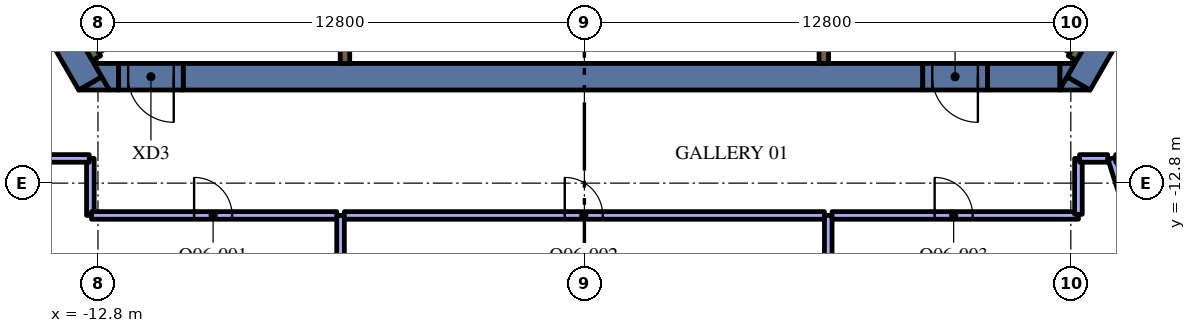
"""IFC4 building model, lengths in metres.
Left out: names, types, materials, properties, quantities, classifications, styles, units other than length and angle.
Written with IfcOpenShell. Run it as: python <this file> out.ifc"""

import sys

from ifc_helpers import new_model, si_unit, direction, frame, frame_2d, origin, place, context, subcontext, project, spatial, polyline, rectangle, outline, extrude, element, fill, save


model = new_model("IFC4")
c1 = context("Model", 3, precision=1e-05, world=origin(), true_north=direction((0.0, 1.0)))
c2 = subcontext(c1, "Body", "Model", "MODEL_VIEW")
j1 = project(units=[si_unit("LENGTHUNIT", "METRE"), si_unit("PLANEANGLEUNIT", "RADIAN")], contexts=[c1])
p1 = place(None, origin())
s1 = spatial("IfcSite", under=j1, at=p1, CompositionType="ELEMENT")
p2 = place(p1, origin())
s2 = spatial("IfcBuilding", under=s1, at=p2, CompositionType="ELEMENT")
p3 = place(p2, frame((0.0, 0.0, 210.0)))
s3 = spatial("IfcBuildingStorey", under=s2, at=p3, CompositionType="ELEMENT", Elevation=210.0)
p4 = place(p3, frame((13.003, -10.179, 0.0), z_axis=(0.0, 0.0, 1.0), x_axis=(0.499972675833, 0.866041178825, 0.0)))
e1 = element("IfcWall", 1, at=p4, inside=s3, PredefinedType="SOLIDWALL", context=c2, shape_type="SweptSolid", body=[
    extrude(rectangle(XDim=3.829, YDim=0.7, at=frame_2d((1.915, 0.0))), origin(), (0.0, 0.0, 1.0), 4.2),
])
p5 = place(p3, origin())
e2 = element("IfcWall", 2, at=p5, inside=s3, PredefinedType="SOLIDWALL", context=c2, shape_type="SweptSolid", body=[
    extrude(outline(polyline([(12.698, -10.005), (13.296, -10.35), (12.5, -10.35), (12.698, -10.005)])), origin(), (0.0, 0.0, 1.0), 4.2),
])
p6 = place(p3, frame((10.604, -10.0, 0.0), z_axis=(0.0, 0.0, 1.0), x_axis=(1.0, 0.0, 0.0)))
e3 = element("IfcWall", 3, at=p6, inside=s3, PredefinedType="SOLIDWALL", context=c2, shape_type="SweptSolid", body=[
    extrude(rectangle(XDim=1.909, YDim=0.7, at=frame_2d((0.955, 0.0))), origin(), (0.0, 0.0, 1.0), 4.2),
])
e4 = element("IfcWall", 4, at=p5, inside=s3, PredefinedType="SOLIDWALL", context=c2, shape_type="SweptSolid", body=[
    extrude(outline(polyline([(12.904, -9.65), (12.516, -10.322), (12.516, -9.65), (12.904, -9.65)])), origin(), (0.0, 0.0, 1.0), 4.2),
])
p7 = place(p3, frame((-14.917, -6.863, 0.0), z_axis=(0.0, 0.0, 1.0), x_axis=(0.499972675833, -0.866041178825, 0.0)))
e5 = element("IfcWall", 5, at=p7, inside=s3, PredefinedType="SOLIDWALL", context=c2, shape_type="SweptSolid", body=[
    extrude(rectangle(XDim=3.829, YDim=0.7, at=frame_2d((1.915, 0.0))), origin(), (0.0, 0.0, 1.0), 4.2),
])
e6 = element("IfcWall", 6, at=p5, inside=s3, PredefinedType="SOLIDWALL", context=c2, shape_type="SweptSolid", body=[
    extrude(outline(polyline([(-12.5, -10.35), (-13.296, -10.35), (-12.698, -10.005), (-12.5, -10.35)])), origin(), (0.0, 0.0, 1.0), 4.2),
])
e7 = element("IfcWall", 7, at=p5, inside=s3, PredefinedType="SOLIDWALL", context=c2, shape_type="SweptSolid", body=[
    extrude(outline(polyline([(-12.257, -10.35), (-12.5, -10.35), (-12.904, -9.65), (-12.257, -9.65), (-12.257, -10.35)])), origin(), (0.0, 0.0, 1.0), 4.2),
])
p8 = place(p3, frame((-10.556, -10.0, 0.0), z_axis=(0.0, 0.0, 1.0), x_axis=(1.0, 0.0, 0.0)))
e8 = element("IfcWall", 8, at=p8, inside=s3, PredefinedType="SOLIDWALL", context=c2, shape_type="SweptSolid", body=[
    extrude(rectangle(XDim=19.461, YDim=0.7, at=frame_2d((9.73, 0.0))), origin(), (0.0, 0.0, 1.0), 4.2),
])
p9 = place(p3, frame((12.84, -9.511, 0.0), z_axis=(0.0, 0.0, 1.0), x_axis=(0.500048121057, 0.865997619297, 0.0)))
e9 = element("IfcWall", 9, at=p9, inside=s3, PredefinedType="SOLIDWALL", context=c2, shape_type="SweptSolid", body=[
    extrude(rectangle(XDim=3.634, YDim=0.25, at=frame_2d((1.817, 0.0))), origin(), (0.0, 0.0, 1.0), 4.2),
])
p10 = place(p3, frame((12.84, -9.261, 0.0), z_axis=(0.0, 0.0, 1.0), x_axis=(-0.866013990052, 0.500019768644, 0.0)))
e10 = element("IfcWall", 10, at=p10, inside=s3, PredefinedType="SOLIDWALL", context=c2, shape_type="SweptSolid", body=[
    extrude(rectangle(XDim=6.8, YDim=0.25, at=frame_2d((3.4, 0.0))), origin(), (0.0, 0.0, 1.0), 4.2),
])
p11 = place(p3, frame((-12.84, -9.511, 0.0), z_axis=(0.0, 0.0, 1.0), x_axis=(-0.500048121057, 0.865997619297, 0.0)))
e11 = element("IfcWall", 11, at=p11, inside=s3, PredefinedType="SOLIDWALL", context=c2, shape_type="SweptSolid", body=[
    extrude(rectangle(XDim=3.634, YDim=0.25, at=frame_2d((1.817, 0.0))), origin(), (0.0, 0.0, 1.0), 4.2),
])
p12 = place(p3, frame((-12.84, -9.261, 0.0), z_axis=(0.0, 0.0, 1.0), x_axis=(0.866016039709, 0.500016218704, 0.0)))
e12 = element("IfcWall", 12, at=p12, inside=s3, PredefinedType="SOLIDWALL", context=c2, shape_type="SweptSolid", body=[
    extrude(rectangle(XDim=7.05, YDim=0.25, at=frame_2d((3.525, 0.0))), origin(), (0.0, 0.0, 1.0), 4.2),
])
p13 = place(p3, frame((-6.3, -9.052, 0.0), z_axis=(0.0, 0.0, 1.0), x_axis=(0.0, -1.0, 0.0)))
e13 = element("IfcWall", 13, at=p13, inside=s3, PredefinedType="SOLIDWALL", context=c2, shape_type="SweptSolid", body=[
    extrude(rectangle(XDim=0.598, YDim=0.25, at=frame_2d((0.299, 0.0))), origin(), (0.0, 0.0, 1.0), 4.2),
])
p14 = place(p3, frame((6.3, -9.65, 0.0), z_axis=(0.0, 0.0, 1.0), x_axis=(0.0, 1.0, 0.0)))
e14 = element("IfcWall", 14, at=p14, inside=s3, PredefinedType="SOLIDWALL", context=c2, shape_type="SweptSolid", body=[
    extrude(rectangle(XDim=1.008, YDim=0.25, at=frame_2d((0.504, 0.0))), origin(), (0.0, 0.0, 1.0), 4.2),
])
p15 = place(p3, frame((10.604, -10.0, 0.0), z_axis=(0.0, 0.0, 1.0), x_axis=(-1.0, 0.0, 0.0)))
e15 = element("IfcWall", 15, at=p15, inside=s3, PredefinedType="SOLIDWALL", context=c2, shape_type="SweptSolid", body=[
    extrude(rectangle(XDim=1.7, YDim=0.7, at=frame_2d((0.85, 0.0))), origin(), (0.0, 0.0, 1.0), 4.2),
])
p16 = place(p15, frame((0.25, 0.0, 0.0)))
e16 = element("IfcOpeningElement", 16, at=p16, cuts=e15, PredefinedType="OPENING", context=c2, shape_type="SweptSolid", body=[
    extrude(rectangle(XDim=1.2, YDim=2.1, at=frame_2d((0.6, 1.05))), frame((0.0, 0.36, 0.0), z_axis=(0.0, -1.0, 0.0), x_axis=(1.0, 0.0, 0.0)), (0.0, 0.0, 1.0), 0.72),
])
p17 = place(p3, frame((-10.556, -10.0, 0.0), z_axis=(0.0, 0.0, 1.0), x_axis=(-1.0, 0.0, 0.0)))
e17 = element("IfcWall", 17, at=p17, inside=s3, PredefinedType="SOLIDWALL", context=c2, shape_type="SweptSolid", body=[
    extrude(rectangle(XDim=1.7, YDim=0.7, at=frame_2d((0.85, 0.0))), origin(), (0.0, 0.0, 1.0), 4.2),
])
p18 = place(p17, frame((0.25, 0.0, 0.0)))
e18 = element("IfcOpeningElement", 18, at=p18, cuts=e17, PredefinedType="OPENING", context=c2, shape_type="SweptSolid", body=[
    extrude(rectangle(XDim=1.2, YDim=2.1, at=frame_2d((0.6, 1.05))), frame((0.0, 0.36, 0.0), z_axis=(0.0, -1.0, 0.0), x_axis=(1.0, 0.0, 0.0)), (0.0, 0.0, 1.0), 0.72),
])
p19 = place(p3, frame((-6.417, -13.65, 0.0), z_axis=(0.0, 0.0, 1.0), x_axis=(0.0, -1.0, 0.0)))
e19 = element("IfcWall", 19, at=p19, inside=s3, PredefinedType="PARTITIONING", context=c2, shape_type="SweptSolid", body=[
    extrude(rectangle(XDim=5.247, YDim=0.2, at=frame_2d((2.624, 0.0))), origin(), (0.0, 0.0, 1.0), 3.45),
])
p20 = place(p3, frame((-13.0, -12.15, 0.0), z_axis=(0.0, 0.0, 1.0), x_axis=(0.0, -1.0, 0.0)))
e20 = element("IfcWall", 20, at=p20, inside=s3, PredefinedType="PARTITIONING", context=c2, shape_type="SweptSolid", body=[
    extrude(rectangle(XDim=1.5, YDim=0.2, at=frame_2d((0.75, 0.0))), origin(), (0.0, 0.0, 1.0), 3.45),
])
p21 = place(p3, frame((-12.97, -13.65, 0.0), z_axis=(0.0, 0.0, 1.0), x_axis=(1.0, 0.0, 0.0)))
e21 = element("IfcWall", 21, at=p21, inside=s3, PredefinedType="PARTITIONING", context=c2, shape_type="SweptSolid", body=[
    extrude(rectangle(XDim=6.453, YDim=0.2, at=frame_2d((3.227, 0.0))), origin(), (0.0, 0.0, 1.0), 3.45),
])
p22 = place(p21, frame((2.7, 0.0, 0.0)))
e22 = element("IfcOpeningElement", 22, at=p22, cuts=e21, PredefinedType="OPENING", context=c2, shape_type="SweptSolid", body=[
    extrude(rectangle(XDim=1.0, YDim=2.1, at=frame_2d((0.5, 1.05))), frame((0.0, 0.11, 0.0), z_axis=(0.0, -1.0, 0.0), x_axis=(1.0, 0.0, 0.0)), (0.0, 0.0, 1.0), 0.22),
])
p23 = place(p3, frame((-14.347, -12.15, 0.0), z_axis=(0.0, 0.0, 1.0), x_axis=(1.0, 0.0, 0.0)))
e23 = element("IfcWall", 23, at=p23, inside=s3, PredefinedType="PARTITIONING", context=c2, shape_type="SweptSolid", body=[
    extrude(rectangle(XDim=1.317, YDim=0.2, at=frame_2d((0.659, 0.0))), origin(), (0.0, 0.0, 1.0), 3.45),
])
p24 = place(p3, frame((6.417, -13.65, 0.0), z_axis=(0.0, 0.0, 1.0), x_axis=(0.0, -1.0, 0.0)))
e24 = element("IfcWall", 24, at=p24, inside=s3, PredefinedType="PARTITIONING", context=c2, shape_type="SweptSolid", body=[
    extrude(rectangle(XDim=5.247, YDim=0.2, at=frame_2d((2.624, 0.0))), origin(), (0.0, 0.0, 1.0), 3.45),
])
p25 = place(p3, frame((-6.317, -13.65, 0.0), z_axis=(0.0, 0.0, 1.0), x_axis=(1.0, 0.0, 0.0)))
e25 = element("IfcWall", 25, at=p25, inside=s3, PredefinedType="PARTITIONING", context=c2, shape_type="SweptSolid", body=[
    extrude(rectangle(XDim=12.634, YDim=0.2, at=frame_2d((6.317, 0.0))), origin(), (0.0, 0.0, 1.0), 3.45),
])
p26 = place(p25, frame((5.8, 0.0, 0.0)))
e26 = element("IfcOpeningElement", 26, at=p26, cuts=e25, PredefinedType="OPENING", context=c2, shape_type="SweptSolid", body=[
    extrude(rectangle(XDim=1.0, YDim=2.1, at=frame_2d((0.5, 1.05))), frame((0.0, 0.11, 0.0), z_axis=(0.0, -1.0, 0.0), x_axis=(1.0, 0.0, 0.0)), (0.0, 0.0, 1.0), 0.22),
])
p27 = place(p3, frame((13.875, -12.15, 0.0), z_axis=(0.0, 0.0, 1.0), x_axis=(0.3005606746, -0.953762696316, 0.0)))
e27 = element("IfcWall", 27, at=p27, inside=s3, PredefinedType="PARTITIONING", context=c2, shape_type="SweptSolid", body=[
    extrude(rectangle(XDim=6.9, YDim=0.2, at=frame_2d((3.45, 0.0))), origin(), (0.0, 0.0, 1.0), 3.45),
])
p28 = place(p3, frame((6.517, -13.65, 0.0), z_axis=(0.0, 0.0, 1.0), x_axis=(1.0, 0.0, 0.0)))
e28 = element("IfcWall", 28, at=p28, inside=s3, PredefinedType="PARTITIONING", context=c2, shape_type="SweptSolid", body=[
    extrude(rectangle(XDim=6.483, YDim=0.2, at=frame_2d((3.242, 0.0))), origin(), (0.0, 0.0, 1.0), 3.45),
])
p29 = place(p28, frame((2.7, 0.0, 0.0)))
e29 = element("IfcOpeningElement", 29, at=p29, cuts=e28, PredefinedType="OPENING", context=c2, shape_type="SweptSolid", body=[
    extrude(rectangle(XDim=1.0, YDim=2.1, at=frame_2d((0.5, 1.05))), frame((0.0, 0.11, 0.0), z_axis=(0.0, -1.0, 0.0), x_axis=(1.0, 0.0, 0.0)), (0.0, 0.0, 1.0), 0.22),
])
p30 = place(p3, frame((13.0, -13.62, 0.0), z_axis=(0.0, 0.0, 1.0), x_axis=(0.0, 1.0, 0.0)))
e30 = element("IfcWall", 30, at=p30, inside=s3, PredefinedType="PARTITIONING", context=c2, shape_type="SweptSolid", body=[
    extrude(rectangle(XDim=1.47, YDim=0.2, at=frame_2d((0.735, 0.0))), origin(), (0.0, 0.0, 1.0), 3.45),
])
p31 = place(p3, frame((13.03, -12.15, 0.0), z_axis=(0.0, 0.0, 1.0), x_axis=(1.0, 0.0, 0.0)))
e31 = element("IfcWall", 31, at=p31, inside=s3, PredefinedType="PARTITIONING", context=c2, shape_type="SweptSolid", body=[
    extrude(rectangle(XDim=0.74, YDim=0.2, at=frame_2d((0.37, 0.0))), origin(), (0.0, 0.0, 1.0), 3.45),
])
p32 = place(p3, frame((13.98, -12.15, 0.0), z_axis=(0.0, 0.0, 1.0), x_axis=(1.0, 0.0, 0.0)))
e32 = element("IfcWall", 32, at=p32, inside=s3, PredefinedType="PARTITIONING", context=c2, shape_type="SweptSolid", body=[
    extrude(rectangle(XDim=0.367, YDim=0.2, at=frame_2d((0.184, 0.0))), origin(), (0.0, 0.0, 1.0), 3.45),
])
p33 = place(p16, origin())
e33 = element("IfcDoor", 33, at=p33, inside=s3, OperationType="SINGLE_SWING_LEFT", PredefinedType="DOOR", context=c2, shape_type="SweptSolid", body=[
    extrude(rectangle(XDim=1.2, YDim=2.1, at=frame_2d((0.6, 1.05))), frame((0.0, 0.025, 0.0), z_axis=(0.0, -1.0, 0.0), x_axis=(1.0, 0.0, 0.0)), (0.0, 0.0, 1.0), 0.05),
])
fill(e16, e33)
p34 = place(p18, origin())
e34 = element("IfcDoor", 34, at=p34, inside=s3, OperationType="SINGLE_SWING_LEFT", PredefinedType="DOOR", context=c2, shape_type="SweptSolid", body=[
    extrude(rectangle(XDim=1.2, YDim=2.1, at=frame_2d((0.6, 1.05))), frame((0.0, 0.025, 0.0), z_axis=(0.0, -1.0, 0.0), x_axis=(1.0, 0.0, 0.0)), (0.0, 0.0, 1.0), 0.05),
])
fill(e18, e34)
p35 = place(p22, origin())
e35 = element("IfcDoor", 35, at=p35, inside=s3, OperationType="SINGLE_SWING_LEFT", PredefinedType="DOOR", context=c2, shape_type="SweptSolid", body=[
    extrude(rectangle(XDim=1.0, YDim=2.1, at=frame_2d((0.5, 1.05))), frame((0.0, 0.025, 0.0), z_axis=(0.0, -1.0, 0.0), x_axis=(1.0, 0.0, 0.0)), (0.0, 0.0, 1.0), 0.05),
])
fill(e22, e35)
p36 = place(p26, origin())
e36 = element("IfcDoor", 36, at=p36, inside=s3, OperationType="SINGLE_SWING_LEFT", PredefinedType="DOOR", context=c2, shape_type="SweptSolid", body=[
    extrude(rectangle(XDim=1.0, YDim=2.1, at=frame_2d((0.5, 1.05))), frame((0.0, 0.025, 0.0), z_axis=(0.0, -1.0, 0.0), x_axis=(1.0, 0.0, 0.0)), (0.0, 0.0, 1.0), 0.05),
])
fill(e26, e36)
p37 = place(p29, origin())
e37 = element("IfcDoor", 37, at=p37, inside=s3, OperationType="SINGLE_SWING_LEFT", PredefinedType="DOOR", context=c2, shape_type="SweptSolid", body=[
    extrude(rectangle(XDim=1.0, YDim=2.1, at=frame_2d((0.5, 1.05))), frame((0.0, 0.025, 0.0), z_axis=(0.0, -1.0, 0.0), x_axis=(1.0, 0.0, 0.0)), (0.0, 0.0, 1.0), 0.05),
])
fill(e29, e37)
save(model, sys.argv[1])
